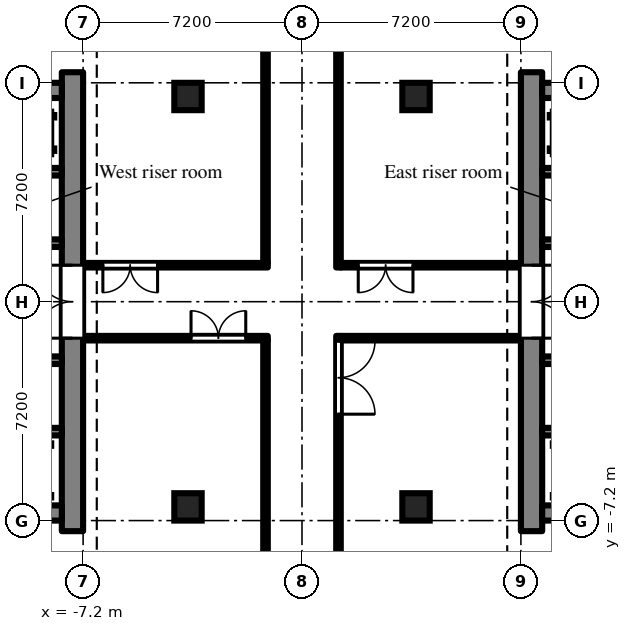
"""IFC4 building model, lengths in metres.
Left out: names, types, materials, properties, quantities, classifications, styles, units other than length and angle.
Written with IfcOpenShell. Run it as: python <this file> out.ifc"""

import sys

from ifc_helpers import new_model, si_unit, direction, frame, frame_2d, origin, origin_2d, place, context, subcontext, project, spatial, rectangle, extrude, element, fill, save


model = new_model("IFC4")
c1 = context("Model", 3, precision=1e-05, world=origin(), true_north=direction((0.0, 1.0)))
c2 = subcontext(c1, "Body", "Model", "MODEL_VIEW")
j1 = project(units=[si_unit("LENGTHUNIT", "METRE"), si_unit("PLANEANGLEUNIT", "RADIAN")], contexts=[c1])
p1 = place(None, origin())
s1 = spatial("IfcSite", under=j1, at=p1, CompositionType="ELEMENT")
p2 = place(p1, origin())
s2 = spatial("IfcBuilding", under=s1, at=p2, CompositionType="ELEMENT")
p3 = place(p2, frame((0.0, 0.0, -4.8)))
s3 = spatial("IfcBuildingStorey", under=s2, at=p3, CompositionType="ELEMENT", Elevation=-4.8)
for number, where, z_axis, x_axis in (
    (1, (-3.75, -6.75, -0.5), (0.0, 0.0, 1.0), (1.0, 0.0, 0.0)),
    (2, (-3.75, 6.75, -0.5), (0.0, 0.0, 1.0), (1.0, 0.0, 0.0)),
    (3, (3.75, -6.75, -0.5), (0.0, 0.0, 1.0), (1.0, 0.0, 0.0)),
    (4, (3.75, 6.75, -0.5), (0.0, 0.0, 1.0), (1.0, 0.0, 0.0)),
):
    element("IfcColumn", number, at=place(p3, frame(where, z_axis=z_axis, x_axis=x_axis)), inside=s3, PredefinedType="COLUMN", context=c2, shape_type="SweptSolid", body=[
        extrude(rectangle(XDim=0.9, YDim=0.9, at=origin_2d()), origin(), (0.0, 0.0, 1.0), 5.3),
    ])
p4 = place(p3, frame((7.55, -7.548, 0.0), z_axis=(0.0, 0.0, 1.0), x_axis=(0.0, 1.0, 0.0)))
e5 = element("IfcWall", 5, at=p4, inside=s3, PredefinedType="SHEAR", context=c2, shape_type="SweptSolid", body=[
    extrude(rectangle(XDim=15.096, YDim=0.7, at=frame_2d((7.548, 0.0))), origin(), (0.0, 0.0, 1.0), 4.35),
])
p5 = place(p4, frame((6.348, 0.0, 0.0)))
e6 = element("IfcOpeningElement", 6, at=p5, cuts=e5, PredefinedType="OPENING", context=c2, shape_type="SweptSolid", body=[
    extrude(rectangle(XDim=2.4, YDim=2.2, at=frame_2d((1.2, 1.1))), frame((0.0, 0.36, 0.0), z_axis=(0.0, -1.0, 0.0), x_axis=(1.0, 0.0, 0.0)), (0.0, 0.0, 1.0), 0.72),
])
p6 = place(p3, frame((7.9, 6.95, 0.0), z_axis=(0.0, 0.0, 1.0), x_axis=(1.0, 0.0, 0.0)))
e7 = element("IfcWall", 7, at=p6, inside=s3, PredefinedType="SHEAR", context=c2, shape_type="SweptSolid", body=[
    extrude(rectangle(XDim=12.95, YDim=0.5, at=frame_2d((6.475, 0.0))), origin(), (0.0, 0.0, 1.0), 4.35),
])
p7 = place(p3, frame((7.9, 1.925, 0.0), z_axis=(0.0, 0.0, 1.0), x_axis=(1.0, 0.0, 0.0)))
e8 = element("IfcWall", 8, at=p7, inside=s3, PredefinedType="SHEAR", context=c2, shape_type="SweptSolid", body=[
    extrude(rectangle(XDim=12.95, YDim=0.25, at=frame_2d((6.475, 0.0))), origin(), (0.0, 0.0, 1.0), 4.35),
])
p8 = place(p7, frame((0.525, 0.0, 0.0)))
e9 = element("IfcOpeningElement", 9, at=p8, cuts=e8, PredefinedType="OPENING", context=c2, shape_type="SweptSolid", body=[
    extrude(rectangle(XDim=0.9, YDim=2.1, at=frame_2d((0.45, 1.05))), frame((0.0, 0.135, 0.0), z_axis=(0.0, -1.0, 0.0), x_axis=(1.0, 0.0, 0.0)), (0.0, 0.0, 1.0), 0.27),
])
p9 = place(p7, frame((2.625, 0.0, 0.0)))
e10 = element("IfcOpeningElement", 10, at=p9, cuts=e8, PredefinedType="OPENING", context=c2, shape_type="SweptSolid", body=[
    extrude(rectangle(XDim=1.1, YDim=2.1, at=frame_2d((0.55, 1.05))), frame((0.0, 0.135, 0.0), z_axis=(0.0, -1.0, 0.0), x_axis=(1.0, 0.0, 0.0)), (0.0, 0.0, 1.0), 0.27),
])
p10 = place(p7, frame((7.125, 0.0, 0.0)))
e11 = element("IfcOpeningElement", 11, at=p10, cuts=e8, PredefinedType="OPENING", context=c2, shape_type="SweptSolid", body=[
    extrude(rectangle(XDim=0.9, YDim=2.1, at=frame_2d((0.45, 1.05))), frame((0.0, 0.135, 0.0), z_axis=(0.0, -1.0, 0.0), x_axis=(1.0, 0.0, 0.0)), (0.0, 0.0, 1.0), 0.27),
])
p11 = place(p3, frame((7.9, 4.275, 0.0), z_axis=(0.0, 0.0, 1.0), x_axis=(1.0, 0.0, 0.0)))
e12 = element("IfcWall", 12, at=p11, inside=s3, PredefinedType="SHEAR", context=c2, shape_type="SweptSolid", body=[
    extrude(rectangle(XDim=1.95, YDim=0.25, at=frame_2d((0.975, 0.0))), origin(), (0.0, 0.0, 1.0), 4.35),
])
p12 = place(p3, frame((7.9, -6.95, 0.0), z_axis=(0.0, 0.0, 1.0), x_axis=(1.0, 0.0, 0.0)))
e13 = element("IfcWall", 13, at=p12, inside=s3, PredefinedType="SHEAR", context=c2, shape_type="SweptSolid", body=[
    extrude(rectangle(XDim=12.95, YDim=0.5, at=frame_2d((6.475, 0.0))), origin(), (0.0, 0.0, 1.0), 4.35),
])
p13 = place(p3, frame((7.9, -1.925, 0.0), z_axis=(0.0, 0.0, 1.0), x_axis=(1.0, 0.0, 0.0)))
e14 = element("IfcWall", 14, at=p13, inside=s3, PredefinedType="SHEAR", context=c2, shape_type="SweptSolid", body=[
    extrude(rectangle(XDim=12.95, YDim=0.25, at=frame_2d((6.475, 0.0))), origin(), (0.0, 0.0, 1.0), 4.35),
])
p14 = place(p13, frame((0.525, 0.0, 0.0)))
e15 = element("IfcOpeningElement", 15, at=p14, cuts=e14, PredefinedType="OPENING", context=c2, shape_type="SweptSolid", body=[
    extrude(rectangle(XDim=0.9, YDim=2.1, at=frame_2d((0.45, 1.05))), frame((0.0, 0.135, 0.0), z_axis=(0.0, -1.0, 0.0), x_axis=(1.0, 0.0, 0.0)), (0.0, 0.0, 1.0), 0.27),
])
p15 = place(p13, frame((2.625, 0.0, 0.0)))
e16 = element("IfcOpeningElement", 16, at=p15, cuts=e14, PredefinedType="OPENING", context=c2, shape_type="SweptSolid", body=[
    extrude(rectangle(XDim=1.1, YDim=2.1, at=frame_2d((0.55, 1.05))), frame((0.0, 0.135, 0.0), z_axis=(0.0, -1.0, 0.0), x_axis=(1.0, 0.0, 0.0)), (0.0, 0.0, 1.0), 0.27),
])
p16 = place(p3, frame((7.9, -4.275, 0.0), z_axis=(0.0, 0.0, 1.0), x_axis=(1.0, 0.0, 0.0)))
e17 = element("IfcWall", 17, at=p16, inside=s3, PredefinedType="SHEAR", context=c2, shape_type="SweptSolid", body=[
    extrude(rectangle(XDim=1.95, YDim=0.25, at=frame_2d((0.975, 0.0))), origin(), (0.0, 0.0, 1.0), 4.35),
])
p17 = place(p3, frame((-7.55, -7.548, 0.0), z_axis=(0.0, 0.0, 1.0), x_axis=(0.0, 1.0, 0.0)))
e18 = element("IfcWall", 18, at=p17, inside=s3, PredefinedType="SHEAR", context=c2, shape_type="SweptSolid", body=[
    extrude(rectangle(XDim=15.096, YDim=0.7, at=frame_2d((7.548, 0.0))), origin(), (0.0, 0.0, 1.0), 4.35),
])
p18 = place(p17, frame((6.348, 0.0, 0.0)))
e19 = element("IfcOpeningElement", 19, at=p18, cuts=e18, PredefinedType="OPENING", context=c2, shape_type="SweptSolid", body=[
    extrude(rectangle(XDim=2.4, YDim=2.2, at=frame_2d((1.2, 1.1))), frame((0.0, 0.36, 0.0), z_axis=(0.0, -1.0, 0.0), x_axis=(1.0, 0.0, 0.0)), (0.0, 0.0, 1.0), 0.72),
])
p19 = place(p3, frame((-7.9, 6.95, 0.0), z_axis=(0.0, 0.0, 1.0), x_axis=(-1.0, 0.0, 0.0)))
e20 = element("IfcWall", 20, at=p19, inside=s3, PredefinedType="SHEAR", context=c2, shape_type="SweptSolid", body=[
    extrude(rectangle(XDim=12.95, YDim=0.5, at=frame_2d((6.475, 0.0))), origin(), (0.0, 0.0, 1.0), 4.35),
])
p20 = place(p3, frame((-7.9, 1.925, 0.0), z_axis=(0.0, 0.0, 1.0), x_axis=(-1.0, 0.0, 0.0)))
e21 = element("IfcWall", 21, at=p20, inside=s3, PredefinedType="SHEAR", context=c2, shape_type="SweptSolid", body=[
    extrude(rectangle(XDim=12.95, YDim=0.25, at=frame_2d((6.475, 0.0))), origin(), (0.0, 0.0, 1.0), 4.35),
])
p21 = place(p20, frame((0.525, 0.0, 0.0)))
e22 = element("IfcOpeningElement", 22, at=p21, cuts=e21, PredefinedType="OPENING", context=c2, shape_type="SweptSolid", body=[
    extrude(rectangle(XDim=0.9, YDim=2.1, at=frame_2d((0.45, 1.05))), frame((0.0, 0.135, 0.0), z_axis=(0.0, -1.0, 0.0), x_axis=(1.0, 0.0, 0.0)), (0.0, 0.0, 1.0), 0.27),
])
p22 = place(p20, frame((2.625, 0.0, 0.0)))
e23 = element("IfcOpeningElement", 23, at=p22, cuts=e21, PredefinedType="OPENING", context=c2, shape_type="SweptSolid", body=[
    extrude(rectangle(XDim=1.1, YDim=2.1, at=frame_2d((0.55, 1.05))), frame((0.0, 0.135, 0.0), z_axis=(0.0, -1.0, 0.0), x_axis=(1.0, 0.0, 0.0)), (0.0, 0.0, 1.0), 0.27),
])
p23 = place(p20, frame((7.125, 0.0, 0.0)))
e24 = element("IfcOpeningElement", 24, at=p23, cuts=e21, PredefinedType="OPENING", context=c2, shape_type="SweptSolid", body=[
    extrude(rectangle(XDim=0.9, YDim=2.1, at=frame_2d((0.45, 1.05))), frame((0.0, 0.135, 0.0), z_axis=(0.0, -1.0, 0.0), x_axis=(1.0, 0.0, 0.0)), (0.0, 0.0, 1.0), 0.27),
])
p24 = place(p3, frame((-7.9, 4.275, 0.0), z_axis=(0.0, 0.0, 1.0), x_axis=(-1.0, 0.0, 0.0)))
e25 = element("IfcWall", 25, at=p24, inside=s3, PredefinedType="SHEAR", context=c2, shape_type="SweptSolid", body=[
    extrude(rectangle(XDim=1.95, YDim=0.25, at=frame_2d((0.975, 0.0))), origin(), (0.0, 0.0, 1.0), 4.35),
])
p25 = place(p3, frame((-7.9, -6.95, 0.0), z_axis=(0.0, 0.0, 1.0), x_axis=(-1.0, 0.0, 0.0)))
e26 = element("IfcWall", 26, at=p25, inside=s3, PredefinedType="SHEAR", context=c2, shape_type="SweptSolid", body=[
    extrude(rectangle(XDim=12.95, YDim=0.5, at=frame_2d((6.475, 0.0))), origin(), (0.0, 0.0, 1.0), 4.35),
])
p26 = place(p3, frame((-7.9, -1.925, 0.0), z_axis=(0.0, 0.0, 1.0), x_axis=(-1.0, 0.0, 0.0)))
e27 = element("IfcWall", 27, at=p26, inside=s3, PredefinedType="SHEAR", context=c2, shape_type="SweptSolid", body=[
    extrude(rectangle(XDim=12.95, YDim=0.25, at=frame_2d((6.475, 0.0))), origin(), (0.0, 0.0, 1.0), 4.35),
])
p27 = place(p26, frame((0.525, 0.0, 0.0)))
e28 = element("IfcOpeningElement", 28, at=p27, cuts=e27, PredefinedType="OPENING", context=c2, shape_type="SweptSolid", body=[
    extrude(rectangle(XDim=0.9, YDim=2.1, at=frame_2d((0.45, 1.05))), frame((0.0, 0.135, 0.0), z_axis=(0.0, -1.0, 0.0), x_axis=(1.0, 0.0, 0.0)), (0.0, 0.0, 1.0), 0.27),
])
p28 = place(p26, frame((2.625, 0.0, 0.0)))
e29 = element("IfcOpeningElement", 29, at=p28, cuts=e27, PredefinedType="OPENING", context=c2, shape_type="SweptSolid", body=[
    extrude(rectangle(XDim=1.1, YDim=2.1, at=frame_2d((0.55, 1.05))), frame((0.0, 0.135, 0.0), z_axis=(0.0, -1.0, 0.0), x_axis=(1.0, 0.0, 0.0)), (0.0, 0.0, 1.0), 0.27),
])
p29 = place(p3, frame((-7.9, -4.275, 0.0), z_axis=(0.0, 0.0, 1.0), x_axis=(-1.0, 0.0, 0.0)))
e30 = element("IfcWall", 30, at=p29, inside=s3, PredefinedType="SHEAR", context=c2, shape_type="SweptSolid", body=[
    extrude(rectangle(XDim=1.95, YDim=0.25, at=frame_2d((0.975, 0.0))), origin(), (0.0, 0.0, 1.0), 4.35),
])
p30 = place(p3, frame((-7.2, -1.2, 0.0), z_axis=(0.0, 0.0, 1.0), x_axis=(1.0, 0.0, 0.0)))
e31 = element("IfcWall", 31, at=p30, inside=s3, PredefinedType="PARTITIONING", context=c2, shape_type="SweptSolid", body=[
    extrude(rectangle(XDim=6.075, YDim=0.15, at=frame_2d((3.038, 0.0))), origin(), (0.0, 0.0, 1.0), 4.35),
])
p31 = place(p30, frame((3.55, 0.0, 0.0)))
e32 = element("IfcOpeningElement", 32, at=p31, cuts=e31, PredefinedType="OPENING", context=c2, shape_type="SweptSolid", body=[
    extrude(rectangle(XDim=1.8, YDim=2.1, at=frame_2d((0.9, 1.05))), frame((0.0, 0.085, 0.0), z_axis=(0.0, -1.0, 0.0), x_axis=(1.0, 0.0, 0.0)), (0.0, 0.0, 1.0), 0.17),
])
p32 = place(p3, frame((-7.2, 1.2, 0.0), z_axis=(0.0, 0.0, 1.0), x_axis=(1.0, 0.0, 0.0)))
e33 = element("IfcWall", 33, at=p32, inside=s3, PredefinedType="PARTITIONING", context=c2, shape_type="SweptSolid", body=[
    extrude(rectangle(XDim=6.075, YDim=0.15, at=frame_2d((3.038, 0.0))), origin(), (0.0, 0.0, 1.0), 4.35),
])
p33 = place(p32, frame((0.65, 0.0, 0.0)))
e34 = element("IfcOpeningElement", 34, at=p33, cuts=e33, PredefinedType="OPENING", context=c2, shape_type="SweptSolid", body=[
    extrude(rectangle(XDim=1.8, YDim=2.1, at=frame_2d((0.9, 1.05))), frame((0.0, 0.085, 0.0), z_axis=(0.0, -1.0, 0.0), x_axis=(1.0, 0.0, 0.0)), (0.0, 0.0, 1.0), 0.17),
])
p34 = place(p3, frame((-1.2, -16.725, 0.0), z_axis=(0.0, 0.0, 1.0), x_axis=(0.0, 1.0, 0.0)))
e35 = element("IfcWall", 35, at=p34, inside=s3, PredefinedType="PARTITIONING", context=c2, shape_type="SweptSolid", body=[
    extrude(rectangle(XDim=15.45, YDim=0.15, at=frame_2d((7.725, 0.0))), origin(), (0.0, 0.0, 1.0), 4.35),
])
p35 = place(p34, frame((0.575, 0.0, 0.0)))
e36 = element("IfcOpeningElement", 36, at=p35, cuts=e35, PredefinedType="OPENING", context=c2, shape_type="SweptSolid", body=[
    extrude(rectangle(XDim=1.8, YDim=2.1, at=frame_2d((0.9, 1.05))), frame((0.0, 0.085, 0.0), z_axis=(0.0, -1.0, 0.0), x_axis=(1.0, 0.0, 0.0)), (0.0, 0.0, 1.0), 0.17),
])
p36 = place(p3, frame((-1.2, 1.275, 0.0), z_axis=(0.0, 0.0, 1.0), x_axis=(0.0, 1.0, 0.0)))
e37 = element("IfcWall", 37, at=p36, inside=s3, PredefinedType="PARTITIONING", context=c2, shape_type="SweptSolid", body=[
    extrude(rectangle(XDim=15.45, YDim=0.15, at=frame_2d((7.725, 0.0))), origin(), (0.0, 0.0, 1.0), 4.35),
])
p37 = place(p3, frame((1.2, -16.875, 0.0), z_axis=(0.0, 0.0, 1.0), x_axis=(0.0, 1.0, 0.0)))
e38 = element("IfcWall", 38, at=p37, inside=s3, PredefinedType="PARTITIONING", context=c2, shape_type="SweptSolid", body=[
    extrude(rectangle(XDim=15.75, YDim=0.15, at=frame_2d((7.875, 0.0))), origin(), (0.0, 0.0, 1.0), 4.35),
])
p38 = place(p37, frame((13.175, 0.0, 0.0)))
e39 = element("IfcOpeningElement", 39, at=p38, cuts=e38, PredefinedType="OPENING", context=c2, shape_type="SweptSolid", body=[
    extrude(rectangle(XDim=2.4, YDim=2.1, at=frame_2d((1.2, 1.05))), frame((0.0, 0.085, 0.0), z_axis=(0.0, -1.0, 0.0), x_axis=(1.0, 0.0, 0.0)), (0.0, 0.0, 1.0), 0.17),
])
p39 = place(p37, frame((3.675, 0.0, 0.0)))
e40 = element("IfcOpeningElement", 40, at=p39, cuts=e38, PredefinedType="OPENING", context=c2, shape_type="SweptSolid", body=[
    extrude(rectangle(XDim=2.4, YDim=2.1, at=frame_2d((1.2, 1.05))), frame((0.0, 0.085, 0.0), z_axis=(0.0, -1.0, 0.0), x_axis=(1.0, 0.0, 0.0)), (0.0, 0.0, 1.0), 0.17),
])
p40 = place(p3, frame((1.275, -1.2, 0.0), z_axis=(0.0, 0.0, 1.0), x_axis=(1.0, 0.0, 0.0)))
e41 = element("IfcWall", 41, at=p40, inside=s3, PredefinedType="PARTITIONING", context=c2, shape_type="SweptSolid", body=[
    extrude(rectangle(XDim=5.925, YDim=0.15, at=frame_2d((2.962, 0.0))), origin(), (0.0, 0.0, 1.0), 4.35),
])
p41 = place(p3, frame((1.2, 1.125, 0.0), z_axis=(0.0, 0.0, 1.0), x_axis=(0.0, 1.0, 0.0)))
e42 = element("IfcWall", 42, at=p41, inside=s3, PredefinedType="PARTITIONING", context=c2, shape_type="SweptSolid", body=[
    extrude(rectangle(XDim=15.75, YDim=0.15, at=frame_2d((7.875, 0.0))), origin(), (0.0, 0.0, 1.0), 4.35),
])
p42 = place(p41, frame((13.225, 0.0, 0.0)))
e43 = element("IfcOpeningElement", 43, at=p42, cuts=e42, PredefinedType="OPENING", context=c2, shape_type="SweptSolid", body=[
    extrude(rectangle(XDim=1.8, YDim=2.1, at=frame_2d((0.9, 1.05))), frame((0.0, 0.085, 0.0), z_axis=(0.0, -1.0, 0.0), x_axis=(1.0, 0.0, 0.0)), (0.0, 0.0, 1.0), 0.17),
])
p43 = place(p3, frame((1.275, 1.2, 0.0), z_axis=(0.0, 0.0, 1.0), x_axis=(1.0, 0.0, 0.0)))
e44 = element("IfcWall", 44, at=p43, inside=s3, PredefinedType="PARTITIONING", context=c2, shape_type="SweptSolid", body=[
    extrude(rectangle(XDim=5.925, YDim=0.15, at=frame_2d((2.962, 0.0))), origin(), (0.0, 0.0, 1.0), 4.35),
])
p44 = place(p43, frame((0.575, 0.0, 0.0)))
e45 = element("IfcOpeningElement", 45, at=p44, cuts=e44, PredefinedType="OPENING", context=c2, shape_type="SweptSolid", body=[
    extrude(rectangle(XDim=1.8, YDim=2.1, at=frame_2d((0.9, 1.05))), frame((0.0, 0.085, 0.0), z_axis=(0.0, -1.0, 0.0), x_axis=(1.0, 0.0, 0.0)), (0.0, 0.0, 1.0), 0.17),
])
p45 = place(p5, frame((2.4, 0.0, 0.0), z_axis=(0.0, 0.0, 1.0), x_axis=(-1.0, 0.0, 0.0)))
e46 = element("IfcDoor", 46, at=p45, inside=s3, OperationType="DOUBLE_DOOR_DOUBLE_SWING", PredefinedType="DOOR", context=c2, shape_type="SweptSolid", body=[
    extrude(rectangle(XDim=2.4, YDim=2.2, at=frame_2d((1.2, 1.1))), frame((0.0, 0.025, 0.0), z_axis=(0.0, -1.0, 0.0), x_axis=(1.0, 0.0, 0.0)), (0.0, 0.0, 1.0), 0.05),
])
fill(e6, e46)
p46 = place(p18, origin())
e47 = element("IfcDoor", 47, at=p46, inside=s3, OperationType="DOUBLE_DOOR_DOUBLE_SWING", PredefinedType="DOOR", context=c2, shape_type="SweptSolid", body=[
    extrude(rectangle(XDim=2.4, YDim=2.2, at=frame_2d((1.2, 1.1))), frame((0.0, 0.025, 0.0), z_axis=(0.0, -1.0, 0.0), x_axis=(1.0, 0.0, 0.0)), (0.0, 0.0, 1.0), 0.05),
])
fill(e19, e47)
p47 = place(p38, frame((2.4, 0.0, 0.0), z_axis=(0.0, 0.0, 1.0), x_axis=(-1.0, 0.0, 0.0)))
e48 = element("IfcDoor", 48, at=p47, inside=s3, OperationType="DOUBLE_DOOR_DOUBLE_SWING", PredefinedType="DOOR", context=c2, shape_type="SweptSolid", body=[
    extrude(rectangle(XDim=2.4, YDim=2.1, at=frame_2d((1.2, 1.05))), frame((0.0, 0.025, 0.0), z_axis=(0.0, -1.0, 0.0), x_axis=(1.0, 0.0, 0.0)), (0.0, 0.0, 1.0), 0.05),
])
fill(e39, e48)
p48 = place(p44, frame((1.8, 0.0, 0.0), z_axis=(0.0, 0.0, 1.0), x_axis=(-1.0, 0.0, 0.0)))
e49 = element("IfcDoor", 49, at=p48, inside=s3, OperationType="DOUBLE_DOOR_DOUBLE_SWING", PredefinedType="DOOR", context=c2, shape_type="SweptSolid", body=[
    extrude(rectangle(XDim=1.8, YDim=2.1, at=frame_2d((0.9, 1.05))), frame((0.0, 0.025, 0.0), z_axis=(0.0, -1.0, 0.0), x_axis=(1.0, 0.0, 0.0)), (0.0, 0.0, 1.0), 0.05),
])
fill(e45, e49)
p49 = place(p33, frame((1.8, 0.0, 0.0), z_axis=(0.0, 0.0, 1.0), x_axis=(-1.0, 0.0, 0.0)))
e50 = element("IfcDoor", 50, at=p49, inside=s3, OperationType="DOUBLE_DOOR_DOUBLE_SWING", PredefinedType="DOOR", context=c2, shape_type="SweptSolid", body=[
    extrude(rectangle(XDim=1.8, YDim=2.1, at=frame_2d((0.9, 1.05))), frame((0.0, 0.025, 0.0), z_axis=(0.0, -1.0, 0.0), x_axis=(1.0, 0.0, 0.0)), (0.0, 0.0, 1.0), 0.05),
])
fill(e34, e50)
p50 = place(p31, origin())
e51 = element("IfcDoor", 51, at=p50, inside=s3, OperationType="DOUBLE_DOOR_DOUBLE_SWING", PredefinedType="DOOR", context=c2, shape_type="SweptSolid", body=[
    extrude(rectangle(XDim=1.8, YDim=2.1, at=frame_2d((0.9, 1.05))), frame((0.0, 0.025, 0.0), z_axis=(0.0, -1.0, 0.0), x_axis=(1.0, 0.0, 0.0)), (0.0, 0.0, 1.0), 0.05),
])
fill(e32, e51)
save(model, sys.argv[1])
